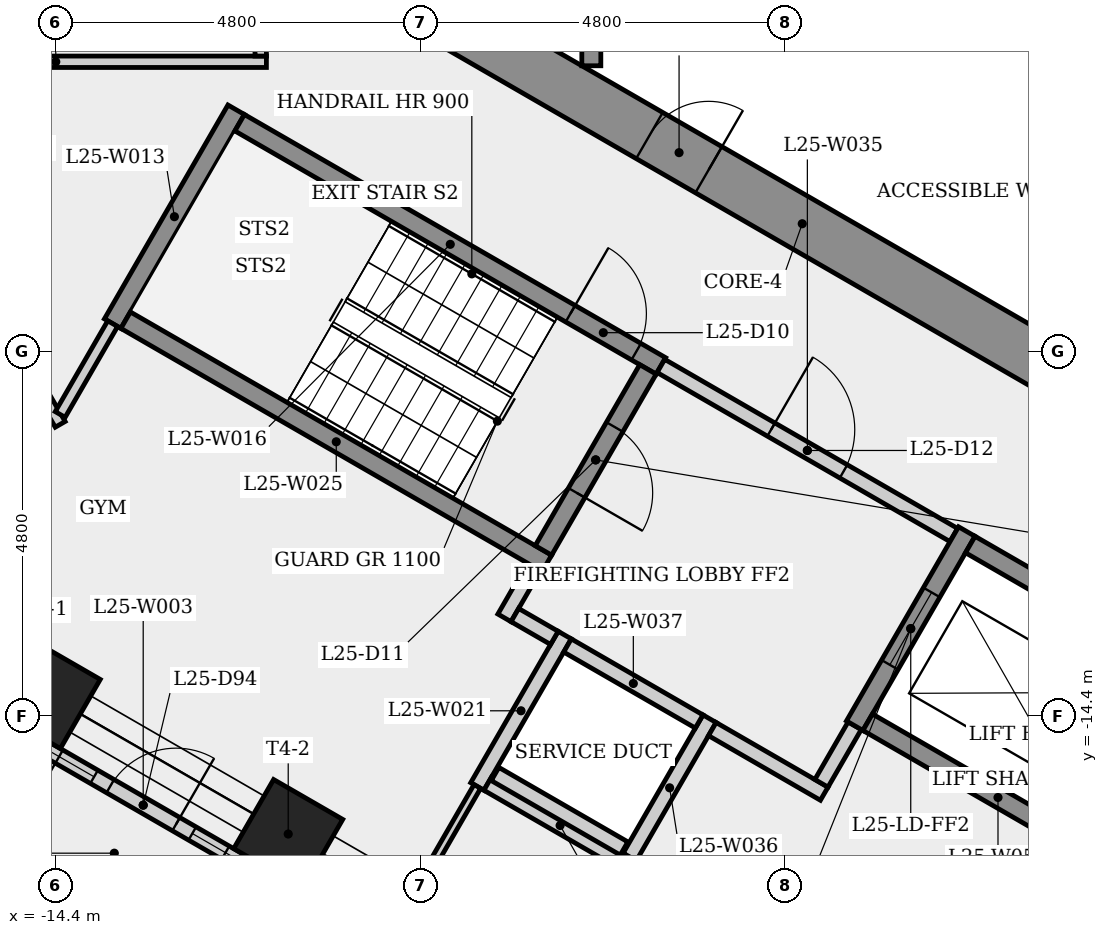
"""IFC4 building model, lengths in metres.
Left out: names, types, materials, properties, quantities, classifications, styles, units other than length and angle.
Written with IfcOpenShell. Run it as: python <this file> out.ifc"""

import sys

from ifc_helpers import new_model, si_unit, direction, frame, frame_2d, origin, origin_2d, place, context, subcontext, project, spatial, rectangle, extrude, element, fill, save


model = new_model("IFC4")
c1 = context("Model", 3, precision=1e-05, world=origin(), true_north=direction((0.0, 1.0)))
c2 = subcontext(c1, "Body", "Model", "MODEL_VIEW")
j1 = project(units=[si_unit("LENGTHUNIT", "METRE"), si_unit("PLANEANGLEUNIT", "RADIAN")], contexts=[c1])
p1 = place(None, origin())
s1 = spatial("IfcSite", under=j1, at=p1, CompositionType="ELEMENT")
p2 = place(p1, origin())
s2 = spatial("IfcBuilding", under=s1, at=p2, CompositionType="ELEMENT")
p3 = place(p2, frame((0.0, 0.0, 96.7)))
s3 = spatial("IfcBuildingStorey", under=s2, at=p3, CompositionType="ELEMENT", Elevation=96.7)
p4 = place(p3, frame((-9.325, -5.182, 0.0), z_axis=(0.0, 0.0, 1.0), x_axis=(0.866023993627, -0.500002442456, 0.0)))
e1 = element("IfcWall", 1, at=p4, inside=s3, PredefinedType="SHEAR", context=c2, shape_type="SweptSolid", body=[
    extrude(rectangle(XDim=10.97, YDim=0.7, at=frame_2d((5.485, 0.0))), origin(), (0.0, 0.0, 1.0), 3.4),
])
p5 = place(p4, frame((3.164, 0.0, 0.0)))
e2 = element("IfcOpeningElement", 2, at=p5, cuts=e1, PredefinedType="OPENING", context=c2, shape_type="SweptSolid", body=[
    extrude(rectangle(XDim=0.9, YDim=2.1, at=frame_2d((0.45, 1.05))), frame((0.0, 0.36, 0.0), z_axis=(0.0, -1.0, 0.0), x_axis=(1.0, 0.0, 0.0)), (0.0, 0.0, 1.0), 0.72),
])
for number, where, z_axis, x_axis in (
    (3, (-14.528, -14.112, 0.0), (0.0, 0.0, 1.0), (-0.5, -0.866, 0.0)),
    (4, (-11.338, -15.954, 0.0), (0.0, 0.0, 1.0), (-0.5, -0.866, 0.0)),
):
    element("IfcColumn", number, at=place(p3, frame(where, z_axis=z_axis, x_axis=x_axis)), inside=s3, PredefinedType="COLUMN", context=c2, shape_type="SweptSolid", body=[
        extrude(rectangle(XDim=1.05, YDim=1.05, at=origin_2d()), origin(), (0.0, 0.0, 1.0), 3.4),
    ])
p6 = place(p3, frame((-14.841, -14.653, 0.0), z_axis=(0.0, 0.0, 1.0), x_axis=(0.866048742478, -0.499959574017, 0.0)))
e5 = element("IfcWall", 5, at=p6, inside=s3, PredefinedType="SOLIDWALL", context=c2, shape_type="SweptSolid", body=[
    extrude(rectangle(XDim=3.684, YDim=0.2, at=frame_2d((1.842, 0.0))), origin(), (0.0, 0.0, 1.0), 3.4),
])
p7 = place(p6, frame((1.342, 0.0, 0.0)))
e6 = element("IfcOpeningElement", 6, at=p7, cuts=e5, PredefinedType="OPENING", context=c2, shape_type="SweptSolid", body=[
    extrude(rectangle(XDim=1.0, YDim=2.4, at=frame_2d((0.5, 1.2))), frame((0.0, 0.11, 0.0), z_axis=(0.0, -1.0, 0.0), x_axis=(1.0, 0.0, 0.0)), (0.0, 0.0, 1.0), 0.22),
])
p8 = place(p6, frame((0.246, 0.0, 0.9)))
e7 = element("IfcOpeningElement", 7, at=p8, cuts=e5, PredefinedType="OPENING", context=c2, shape_type="SweptSolid", body=[
    extrude(rectangle(XDim=0.85, YDim=1.5, at=frame_2d((0.425, 0.75))), frame((0.0, 0.11, 0.0), z_axis=(0.0, -1.0, 0.0), x_axis=(1.0, 0.0, 0.0)), (0.0, 0.0, 1.0), 0.22),
])
p9 = place(p6, frame((2.588, 0.0, 0.9)))
e8 = element("IfcOpeningElement", 8, at=p9, cuts=e5, PredefinedType="OPENING", context=c2, shape_type="SweptSolid", body=[
    extrude(rectangle(XDim=0.85, YDim=1.5, at=frame_2d((0.425, 0.75))), frame((0.0, 0.11, 0.0), z_axis=(0.0, -1.0, 0.0), x_axis=(1.0, 0.0, 0.0)), (0.0, 0.0, 1.0), 0.22),
])
p10 = place(p3, frame((-17.167, -5.793, 0.0), z_axis=(0.0, 0.0, 1.0), x_axis=(1.0, 0.0, 0.0)))
e9 = element("IfcWall", 9, at=p10, inside=s3, PredefinedType="PARTITIONING", context=c2, shape_type="SweptSolid", body=[
    extrude(rectangle(XDim=5.542, YDim=0.15, at=frame_2d((2.771, 0.0))), origin(), (0.0, 0.0, 1.0), 3.05),
])
p11 = place(p3, frame((-14.338, -10.564, 0.0), z_axis=(0.0, 0.0, 1.0), x_axis=(-0.499985629884, 0.866033700216, 0.0)))
e10 = element("IfcWall", 10, at=p11, inside=s3, PredefinedType="PARTITIONING", context=c2, shape_type="SweptSolid", body=[
    extrude(rectangle(XDim=5.434, YDim=0.15, at=frame_2d((2.717, 0.0))), origin(), (0.0, 0.0, 1.0), 3.05),
])
p12 = place(p11, frame((2.254, 0.0, 0.0)))
e11 = element("IfcOpeningElement", 11, at=p12, cuts=e10, PredefinedType="OPENING", context=c2, shape_type="SweptSolid", body=[
    extrude(rectangle(XDim=1.0, YDim=2.1, at=frame_2d((0.5, 1.05))), frame((0.0, 0.085, 0.0), z_axis=(0.0, -1.0, 0.0), x_axis=(1.0, 0.0, 0.0)), (0.0, 0.0, 1.0), 0.17),
])
p13 = place(p3, frame((-13.648, -9.239, 0.0), z_axis=(0.0, 0.0, 1.0), x_axis=(0.500017246033, 0.866015446554, 0.0)))
e12 = element("IfcWall", 12, at=p13, inside=s3, PredefinedType="SHEAR", context=c2, shape_type="SweptSolid", body=[
    extrude(rectangle(XDim=3.25, YDim=0.25, at=frame_2d((1.625, 0.0))), origin(), (0.0, 0.0, 1.0), 3.05),
])
p14 = place(p3, frame((-13.648, -9.239, 0.0), z_axis=(0.0, 0.0, 1.0), x_axis=(-0.500115484592, -0.865958718457, 0.0)))
e13 = element("IfcWall", 13, at=p14, inside=s3, PredefinedType="PARTITIONING", context=c2, shape_type="SweptSolid", body=[
    extrude(rectangle(XDim=1.38, YDim=0.15, at=frame_2d((0.69, 0.0))), origin(), (0.0, 0.0, 1.0), 3.05),
])
p15 = place(p3, frame((-11.977, -6.595, 0.0), z_axis=(0.0, 0.0, 1.0), x_axis=(0.866025499775, -0.499999833739, 0.0)))
e14 = element("IfcWall", 14, at=p15, inside=s3, PredefinedType="SHEAR", context=c2, shape_type="SweptSolid", body=[
    extrude(rectangle(XDim=6.4, YDim=0.25, at=frame_2d((3.2, 0.0))), origin(), (0.0, 0.0, 1.0), 3.05),
])
p16 = place(p15, frame((5.025, 0.0, 0.0)))
e15 = element("IfcOpeningElement", 15, at=p16, cuts=e14, PredefinedType="OPENING", context=c2, shape_type="SweptSolid", body=[
    extrude(rectangle(XDim=1.0, YDim=2.1, at=frame_2d((0.5, 1.05))), frame((0.0, 0.135, 0.0), z_axis=(0.0, -1.0, 0.0), x_axis=(1.0, 0.0, 0.0)), (0.0, 0.0, 1.0), 0.27),
])
p17 = place(p3, frame((-11.7, -5.718, 0.0), z_axis=(0.0, 0.0, 1.0), x_axis=(0.0, 1.0, 0.0)))
e16 = element("IfcWall", 16, at=p17, inside=s3, PredefinedType="PARTITIONING", context=c2, shape_type="SweptSolid", body=[
    extrude(rectangle(XDim=11.436, YDim=0.15, at=frame_2d((5.718, 0.0))), origin(), (0.0, 0.0, 1.0), 3.05),
])
p18 = place(p17, frame((8.092, 0.0, 0.0)))
e17 = element("IfcOpeningElement", 17, at=p18, cuts=e16, PredefinedType="OPENING", context=c2, shape_type="SweptSolid", body=[
    extrude(rectangle(XDim=1.0, YDim=2.1, at=frame_2d((0.5, 1.05))), frame((0.0, 0.085, 0.0), z_axis=(0.0, -1.0, 0.0), x_axis=(1.0, 0.0, 0.0)), (0.0, 0.0, 1.0), 0.17),
])
p19 = place(p17, frame((2.344, 0.0, 0.0)))
e18 = element("IfcOpeningElement", 18, at=p19, cuts=e16, PredefinedType="OPENING", context=c2, shape_type="SweptSolid", body=[
    extrude(rectangle(XDim=1.0, YDim=2.1, at=frame_2d((0.5, 1.05))), frame((0.0, 0.085, 0.0), z_axis=(0.0, -1.0, 0.0), x_axis=(1.0, 0.0, 0.0)), (0.0, 0.0, 1.0), 0.17),
])
p20 = place(p3, frame((-8.85, -15.329, 0.0), z_axis=(0.0, 0.0, 1.0), x_axis=(0.500077740698, 0.865980515519, 0.0)))
e19 = element("IfcWall", 19, at=p20, inside=s3, PredefinedType="PLUMBINGWALL", context=c2, shape_type="SweptSolid", body=[
    extrude(rectangle(XDim=2.3, YDim=0.2, at=frame_2d((1.15, 0.0))), origin(), (0.0, 0.0, 1.0), 3.05),
])
p21 = place(p3, frame((-8.85, -15.329, 0.0), z_axis=(0.0, 0.0, 1.0), x_axis=(-0.500009533716, -0.866019899421, 0.0)))
e20 = element("IfcWall", 20, at=p21, inside=s3, PredefinedType="PARTITIONING", context=c2, shape_type="SweptSolid", body=[
    extrude(rectangle(XDim=2.307, YDim=0.1, at=frame_2d((1.153, 0.0))), origin(), (0.0, 0.0, 1.0), 3.05),
])
p22 = place(p3, frame((-8.493, -13.11, 0.0), z_axis=(0.0, 0.0, 1.0), x_axis=(0.500067724834, 0.865986299303, 0.0)))
e21 = element("IfcWall", 21, at=p22, inside=s3, PredefinedType="PARTITIONING", context=c2, shape_type="SweptSolid", body=[
    extrude(rectangle(XDim=0.775, YDim=0.2, at=frame_2d((0.388, 0.0))), origin(), (0.0, 0.0, 1.0), 3.05),
])
p23 = place(p3, frame((-7.935, -12.393, 0.0), z_axis=(0.0, 0.0, 1.0), x_axis=(-0.866025499775, 0.499999833739, 0.0)))
e22 = element("IfcWall", 22, at=p23, inside=s3, PredefinedType="SHEAR", context=c2, shape_type="SweptSolid", body=[
    extrude(rectangle(XDim=6.4, YDim=0.25, at=frame_2d((3.2, 0.0))), origin(), (0.0, 0.0, 1.0), 3.05),
])
p24 = place(p3, frame((-7.836, -13.373, 0.0), z_axis=(0.0, 0.0, 1.0), x_axis=(-0.866232998003, 0.499640263761, 0.0)))
e23 = element("IfcWall", 23, at=p24, inside=s3, PredefinedType="PARTITIONING", context=c2, shape_type="SweptSolid", body=[
    extrude(rectangle(XDim=0.6, YDim=0.2, at=frame_2d((0.3, 0.0))), origin(), (0.0, 0.0, 1.0), 3.05),
])
p25 = place(p3, frame((-7.35, -5.846, 0.0), z_axis=(0.0, 0.0, 1.0), x_axis=(0.0, 1.0, 0.0)))
e24 = element("IfcWall", 24, at=p25, inside=s3, PredefinedType="SHEAR", context=c2, shape_type="SweptSolid", body=[
    extrude(rectangle(XDim=4.171, YDim=0.25, at=frame_2d((2.085, 0.0))), origin(), (0.0, 0.0, 1.0), 3.05),
])
p26 = place(p3, frame((-6.808, -16.392, 0.0), z_axis=(0.0, 0.0, 1.0), x_axis=(-0.866008176907, 0.50002983664, 0.0)))
e25 = element("IfcWall", 25, at=p26, inside=s3, PredefinedType="PLUMBINGWALL", context=c2, shape_type="SweptSolid", body=[
    extrude(rectangle(XDim=2.2, YDim=0.2, at=frame_2d((1.1, 0.0))), origin(), (0.0, 0.0, 1.0), 3.05),
])
p27 = place(p3, frame((-6.605, -9.841, 0.0), z_axis=(0.0, 0.0, 1.0), x_axis=(-0.499996545922, -0.866027397988, 0.0)))
e26 = element("IfcWall", 26, at=p27, inside=s3, PredefinedType="SHEAR", context=c2, shape_type="SweptSolid", body=[
    extrude(rectangle(XDim=2.75, YDim=0.25, at=frame_2d((1.375, 0.0))), origin(), (0.0, 0.0, 1.0), 3.05),
])
p28 = place(p27, frame((0.875, 0.0, 0.0)))
e27 = element("IfcOpeningElement", 27, at=p28, cuts=e26, PredefinedType="OPENING", context=c2, shape_type="SweptSolid", body=[
    extrude(rectangle(XDim=1.0, YDim=2.1, at=frame_2d((0.5, 1.05))), frame((0.0, 0.135, 0.0), z_axis=(0.0, -1.0, 0.0), x_axis=(1.0, 0.0, 0.0)), (0.0, 0.0, 1.0), 0.27),
])
p29 = place(p3, frame((-6.435, -9.795, 0.0), z_axis=(0.0, 0.0, 1.0), x_axis=(0.866012907634, -0.500021643343, 0.0)))
e28 = element("IfcWall", 28, at=p29, inside=s3, PredefinedType="PARTITIONING", context=c2, shape_type="SweptSolid", body=[
    extrude(rectangle(XDim=4.45, YDim=0.2, at=frame_2d((2.225, 0.0))), origin(), (0.0, 0.0, 1.0), 3.05),
])
p30 = place(p29, frame((1.675, 0.0, 0.0)))
e29 = element("IfcOpeningElement", 29, at=p30, cuts=e28, PredefinedType="OPENING", context=c2, shape_type="SweptSolid", body=[
    extrude(rectangle(XDim=1.1, YDim=2.1, at=frame_2d((0.55, 1.05))), frame((0.0, 0.11, 0.0), z_axis=(0.0, -1.0, 0.0), x_axis=(1.0, 0.0, 0.0)), (0.0, 0.0, 1.0), 0.22),
])
p31 = place(p3, frame((-5.795, -14.437, 0.0), z_axis=(0.0, 0.0, 1.0), x_axis=(-0.500027713859, -0.866009402589, 0.0)))
e30 = element("IfcWall", 30, at=p31, inside=s3, PredefinedType="PLUMBINGWALL", context=c2, shape_type="SweptSolid", body=[
    extrude(rectangle(XDim=2.1, YDim=0.2, at=frame_2d((1.05, 0.0))), origin(), (0.0, 0.0, 1.0), 3.05),
])
p32 = place(p3, frame((-5.931, -14.473, 0.0), z_axis=(0.0, 0.0, 1.0), x_axis=(-0.866041268327, 0.499972520799, 0.0)))
e31 = element("IfcWall", 31, at=p32, inside=s3, PredefinedType="PLUMBINGWALL", context=c2, shape_type="SweptSolid", body=[
    extrude(rectangle(XDim=2.0, YDim=0.2, at=frame_2d((1.0, 0.0))), origin(), (0.0, 0.0, 1.0), 3.05),
])
p33 = place(p3, frame((-4.286, -15.423, 0.0), z_axis=(0.0, 0.0, 1.0), x_axis=(-0.866025371046, 0.500000056704, 0.0)))
e32 = element("IfcWall", 32, at=p33, inside=s3, PredefinedType="PARTITIONING", context=c2, shape_type="SweptSolid", body=[
    extrude(rectangle(XDim=1.7, YDim=0.2, at=frame_2d((0.85, 0.0))), origin(), (0.0, 0.0, 1.0), 3.05),
])
p34 = place(p3, frame((-3.885, -14.529, 0.0), z_axis=(0.0, 0.0, 1.0), x_axis=(-0.499859285417, -0.866106630146, 0.0)))
e33 = element("IfcWall", 33, at=p34, inside=s3, PredefinedType="PARTITIONING", context=c2, shape_type="SweptSolid", body=[
    extrude(rectangle(XDim=0.875, YDim=0.2, at=frame_2d((0.438, 0.0))), origin(), (0.0, 0.0, 1.0), 3.05),
])
p35 = place(p3, frame((-2.41, -11.974, 0.0), z_axis=(0.0, 0.0, 1.0), x_axis=(-0.500001826776, -0.866024349092, 0.0)))
e34 = element("IfcWall", 34, at=p35, inside=s3, PredefinedType="SHEAR", context=c2, shape_type="SweptSolid", body=[
    extrude(rectangle(XDim=2.95, YDim=0.25, at=frame_2d((1.475, 0.0))), origin(), (0.0, 0.0, 1.0), 3.05),
])
p36 = place(p35, frame((0.925, 0.0, 0.0)))
e35 = element("IfcOpeningElement", 35, at=p36, cuts=e34, PredefinedType="OPENING", context=c2, shape_type="SweptSolid", body=[
    extrude(rectangle(XDim=1.1, YDim=2.1, at=frame_2d((0.55, 1.05))), frame((0.0, 0.135, 0.0), z_axis=(0.0, -1.0, 0.0), x_axis=(1.0, 0.0, 0.0)), (0.0, 0.0, 1.0), 0.27),
])
p37 = place(p3, frame((-2.364, -12.145, 0.0), z_axis=(0.0, 0.0, 1.0), x_axis=(0.86603892542, -0.499976579108, 0.0)))
e36 = element("IfcWall", 36, at=p37, inside=s3, PredefinedType="SHEAR", context=c2, shape_type="SweptSolid", body=[
    extrude(rectangle(XDim=2.162, YDim=0.25, at=frame_2d((1.081, 0.0))), origin(), (0.0, 0.0, 1.0), 3.05),
])
p38 = place(p3, frame((-0.856, -16.133, 0.0), z_axis=(0.0, 0.0, 1.0), x_axis=(-0.866021716278, 0.500006386895, 0.0)))
e37 = element("IfcWall", 37, at=p38, inside=s3, PredefinedType="SHEAR", context=c2, shape_type="SweptSolid", body=[
    extrude(rectangle(XDim=3.3, YDim=0.25, at=frame_2d((1.65, 0.0))), origin(), (0.0, 0.0, 1.0), 3.05),
])
p39 = place(p3, frame((-6.919, -16.144, 0.0), z_axis=(0.0, 0.0, 1.0), x_axis=(-0.866042469362, 0.499970440388, 0.0)))
e38 = element("IfcWall", 38, at=p39, inside=s3, PredefinedType="PLUMBINGWALL", context=c2, shape_type="SweptSolid", body=[
    extrude(rectangle(XDim=1.96, YDim=0.2, at=frame_2d((0.98, 0.0))), origin(), (0.0, 0.0, 1.0), 3.05),
])
p40 = place(p7, origin())
e39 = element("IfcDoor", 39, at=p40, inside=s3, OperationType="SINGLE_SWING_RIGHT", PredefinedType="DOOR", context=c2, shape_type="SweptSolid", body=[
    extrude(rectangle(XDim=1.0, YDim=2.4, at=frame_2d((0.5, 1.2))), frame((0.0, 0.025, 0.0), z_axis=(0.0, -1.0, 0.0), x_axis=(1.0, 0.0, 0.0)), (0.0, 0.0, 1.0), 0.05),
])
fill(e6, e39)
p41 = place(p8, origin())
e40 = element("IfcWindow", 40, at=p41, inside=s3, PartitioningType="SINGLE_PANEL", PredefinedType="WINDOW", context=c2, shape_type="SweptSolid", body=[
    extrude(rectangle(XDim=0.85, YDim=1.5, at=frame_2d((0.425, 0.75))), frame((0.0, 0.03, 0.0), z_axis=(0.0, -1.0, 0.0), x_axis=(1.0, 0.0, 0.0)), (0.0, 0.0, 1.0), 0.06),
])
fill(e7, e40)
p42 = place(p9, origin())
e41 = element("IfcWindow", 41, at=p42, inside=s3, PartitioningType="SINGLE_PANEL", PredefinedType="WINDOW", context=c2, shape_type="SweptSolid", body=[
    extrude(rectangle(XDim=0.85, YDim=1.5, at=frame_2d((0.425, 0.75))), frame((0.0, 0.03, 0.0), z_axis=(0.0, -1.0, 0.0), x_axis=(1.0, 0.0, 0.0)), (0.0, 0.0, 1.0), 0.06),
])
fill(e8, e41)
p43 = place(p16, origin())
e42 = element("IfcDoor", 42, at=p43, inside=s3, OperationType="SINGLE_SWING_LEFT", PredefinedType="DOOR", context=c2, shape_type="SweptSolid", body=[
    extrude(rectangle(XDim=1.0, YDim=2.1, at=frame_2d((0.5, 1.05))), frame((0.0, 0.025, 0.0), z_axis=(0.0, -1.0, 0.0), x_axis=(1.0, 0.0, 0.0)), (0.0, 0.0, 1.0), 0.05),
])
fill(e15, e42)
p44 = place(p28, origin())
e43 = element("IfcDoor", 43, at=p44, inside=s3, OperationType="SINGLE_SWING_RIGHT", PredefinedType="DOOR", context=c2, shape_type="SweptSolid", body=[
    extrude(rectangle(XDim=1.0, YDim=2.1, at=frame_2d((0.5, 1.05))), frame((0.0, 0.025, 0.0), z_axis=(0.0, -1.0, 0.0), x_axis=(1.0, 0.0, 0.0)), (0.0, 0.0, 1.0), 0.05),
])
fill(e27, e43)
p45 = place(p30, origin())
e44 = element("IfcDoor", 44, at=p45, inside=s3, OperationType="SINGLE_SWING_LEFT", PredefinedType="DOOR", context=c2, shape_type="SweptSolid", body=[
    extrude(rectangle(XDim=1.1, YDim=2.1, at=frame_2d((0.55, 1.05))), frame((0.0, 0.025, 0.0), z_axis=(0.0, -1.0, 0.0), x_axis=(1.0, 0.0, 0.0)), (0.0, 0.0, 1.0), 0.05),
])
fill(e29, e44)
p46 = place(p36, origin())
e45 = element("IfcDoor", 45, at=p46, inside=s3, OperationType="SLIDING_TO_LEFT", PredefinedType="DOOR", context=c2, shape_type="SweptSolid", body=[
    extrude(rectangle(XDim=1.1, YDim=2.1, at=frame_2d((0.55, 1.05))), frame((0.0, 0.025, 0.0), z_axis=(0.0, -1.0, 0.0), x_axis=(1.0, 0.0, 0.0)), (0.0, 0.0, 1.0), 0.05),
])
fill(e35, e45)
p47 = place(p5, origin())
e46 = element("IfcDoor", 46, at=p47, inside=s3, OperationType="SINGLE_SWING_RIGHT", PredefinedType="DOOR", context=c2, shape_type="SweptSolid", body=[
    extrude(rectangle(XDim=0.9, YDim=2.1, at=frame_2d((0.45, 1.05))), frame((0.0, 0.025, 0.0), z_axis=(0.0, -1.0, 0.0), x_axis=(1.0, 0.0, 0.0)), (0.0, 0.0, 1.0), 0.05),
])
fill(e2, e46)
save(model, sys.argv[1])
